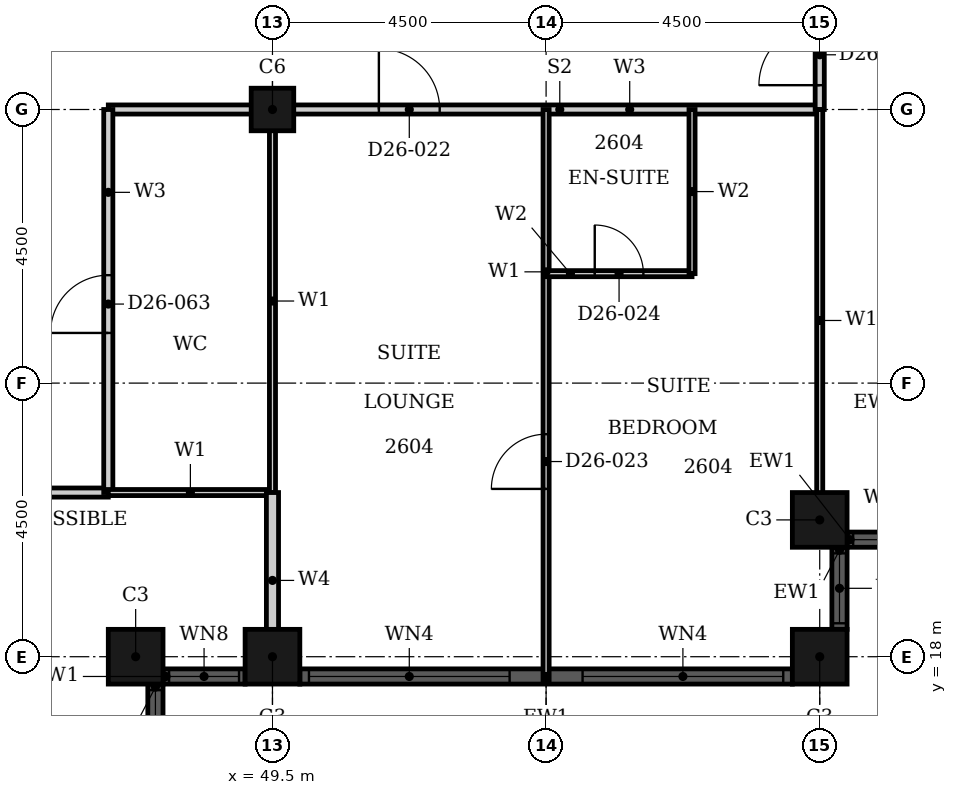
"""IFC4 building model, lengths in metres.
Left out: names, types, materials, properties, quantities, classifications, styles, units other than length and angle.
Written with IfcOpenShell. Run it as: python <this file> out.ifc"""

import sys

from ifc_helpers import new_model, si_unit, direction, frame, frame_2d, origin, origin_2d, place, context, subcontext, project, spatial, rectangle, hollow_rectangle, extrude, element, fill, save


model = new_model("IFC4")
c1 = context("Model", 3, precision=1e-05, world=origin(), true_north=direction((0.0, 1.0)))
c2 = subcontext(c1, "Body", "Model", "MODEL_VIEW")
j1 = project(units=[si_unit("LENGTHUNIT", "METRE"), si_unit("PLANEANGLEUNIT", "RADIAN")], contexts=[c1])
p1 = place(None, origin())
s1 = spatial("IfcSite", under=j1, at=p1, CompositionType="ELEMENT")
p2 = place(p1, origin())
s2 = spatial("IfcBuilding", under=s1, at=p2, CompositionType="ELEMENT")
p3 = place(p2, frame((0.0, 0.0, 108.0)))
s3 = spatial("IfcBuildingStorey", under=s2, at=p3, CompositionType="ELEMENT", Elevation=108.0)
for number, where, z_axis, x_axis in (
    (1, (47.25, 18.0, 0.0), (0.0, 0.0, 1.0), (1.0, 0.0, 0.0)),
    (2, (49.5, 18.0, 0.0), (0.0, 0.0, 1.0), (1.0, 0.0, 0.0)),
    (3, (58.5, 18.0, 0.0), (0.0, 0.0, 1.0), (1.0, 0.0, 0.0)),
    (4, (58.5, 20.25, 0.0), (0.0, 0.0, 1.0), (1.0, 0.0, 0.0)),
):
    element("IfcColumn", number, at=place(p3, frame(where, z_axis=z_axis, x_axis=x_axis)), inside=s3, PredefinedType="COLUMN", context=c2, shape_type="SweptSolid", body=[
        extrude(hollow_rectangle(XDim=0.9, YDim=0.9, WallThickness=0.028, at=origin_2d()), origin(), (0.0, 0.0, 1.0), 3.6),
    ])
p4 = place(p3, frame((49.5, 27.0, 0.0), z_axis=(0.0, 0.0, 1.0), x_axis=(1.0, 0.0, 0.0)))
e5 = element("IfcColumn", 5, at=p4, inside=s3, PredefinedType="COLUMN", context=c2, shape_type="SweptSolid", body=[
    extrude(hollow_rectangle(XDim=0.7, YDim=0.7, WallThickness=0.022, at=origin_2d()), origin(), (0.0, 0.0, 1.0), 3.6),
])
p5 = place(p3, frame((47.575, 16.2, 0.0), z_axis=(0.0, 0.0, 1.0), x_axis=(0.0, 1.0, 0.0)))
e6 = element("IfcWall", 6, at=p5, inside=s3, PredefinedType="SOLIDWALL", context=c2, shape_type="SweptSolid", body=[
    extrude(rectangle(XDim=1.35, YDim=0.25, at=frame_2d((0.675, 0.0))), origin(), (0.0, 0.0, 1.0), 3.6),
])
p6 = place(p5, frame((0.1, 0.0, 0.9)))
e7 = element("IfcOpeningElement", 7, at=p6, cuts=e6, PredefinedType="OPENING", context=c2, shape_type="SweptSolid", body=[
    extrude(rectangle(XDim=1.15, YDim=2.08, at=frame_2d((0.575, 1.04))), frame((0.0, 0.135, 0.0), z_axis=(0.0, -1.0, 0.0), x_axis=(1.0, 0.0, 0.0)), (0.0, 0.0, 1.0), 0.27),
])
p7 = place(p3, frame((47.7, 17.675, 0.0), z_axis=(0.0, 0.0, 1.0), x_axis=(1.0, 0.0, 0.0)))
e8 = element("IfcWall", 8, at=p7, inside=s3, PredefinedType="SOLIDWALL", context=c2, shape_type="SweptSolid", body=[
    extrude(rectangle(XDim=1.35, YDim=0.25, at=frame_2d((0.675, 0.0))), origin(), (0.0, 0.0, 1.0), 3.6),
])
p8 = place(p7, frame((0.1, 0.0, 0.9)))
e9 = element("IfcOpeningElement", 9, at=p8, cuts=e8, PredefinedType="OPENING", context=c2, shape_type="SweptSolid", body=[
    extrude(rectangle(XDim=1.15, YDim=2.08, at=frame_2d((0.575, 1.04))), frame((0.0, 0.135, 0.0), z_axis=(0.0, -1.0, 0.0), x_axis=(1.0, 0.0, 0.0)), (0.0, 0.0, 1.0), 0.27),
])
p9 = place(p3, frame((49.95, 17.675, 0.0), z_axis=(0.0, 0.0, 1.0), x_axis=(1.0, 0.0, 0.0)))
e10 = element("IfcWall", 10, at=p9, inside=s3, PredefinedType="SOLIDWALL", context=c2, shape_type="SweptSolid", body=[
    extrude(rectangle(XDim=8.1, YDim=0.25, at=frame_2d((4.05, 0.0))), origin(), (0.0, 0.0, 1.0), 3.6),
])
p10 = place(p9, frame((0.15, 0.0, 0.9)))
e11 = element("IfcOpeningElement", 11, at=p10, cuts=e10, PredefinedType="OPENING", context=c2, shape_type="SweptSolid", body=[
    extrude(rectangle(XDim=3.3, YDim=2.08, at=frame_2d((1.65, 1.04))), frame((0.0, 0.135, 0.0), z_axis=(0.0, -1.0, 0.0), x_axis=(1.0, 0.0, 0.0)), (0.0, 0.0, 1.0), 0.27),
])
p11 = place(p9, frame((4.65, 0.0, 0.9)))
e12 = element("IfcOpeningElement", 12, at=p11, cuts=e10, PredefinedType="OPENING", context=c2, shape_type="SweptSolid", body=[
    extrude(rectangle(XDim=3.3, YDim=2.08, at=frame_2d((1.65, 1.04))), frame((0.0, 0.135, 0.0), z_axis=(0.0, -1.0, 0.0), x_axis=(1.0, 0.0, 0.0)), (0.0, 0.0, 1.0), 0.27),
])
p12 = place(p3, frame((58.825, 18.45, 0.0), z_axis=(0.0, 0.0, 1.0), x_axis=(0.0, 1.0, 0.0)))
e13 = element("IfcWall", 13, at=p12, inside=s3, PredefinedType="SOLIDWALL", context=c2, shape_type="SweptSolid", body=[
    extrude(rectangle(XDim=1.35, YDim=0.25, at=frame_2d((0.675, 0.0))), origin(), (0.0, 0.0, 1.0), 3.6),
])
p13 = place(p12, frame((0.1, 0.0, 0.9)))
e14 = element("IfcOpeningElement", 14, at=p13, cuts=e13, PredefinedType="OPENING", context=c2, shape_type="SweptSolid", body=[
    extrude(rectangle(XDim=1.15, YDim=2.08, at=frame_2d((0.575, 1.04))), frame((0.0, 0.135, 0.0), z_axis=(0.0, -1.0, 0.0), x_axis=(1.0, 0.0, 0.0)), (0.0, 0.0, 1.0), 0.27),
])
p14 = place(p3, frame((58.95, 19.925, 0.0), z_axis=(0.0, 0.0, 1.0), x_axis=(1.0, 0.0, 0.0)))
e15 = element("IfcWall", 15, at=p14, inside=s3, PredefinedType="SOLIDWALL", context=c2, shape_type="SweptSolid", body=[
    extrude(rectangle(XDim=1.35, YDim=0.25, at=frame_2d((0.675, 0.0))), origin(), (0.0, 0.0, 1.0), 3.6),
])
p15 = place(p14, frame((0.1, 0.0, 0.9)))
e16 = element("IfcOpeningElement", 16, at=p15, cuts=e15, PredefinedType="OPENING", context=c2, shape_type="SweptSolid", body=[
    extrude(rectangle(XDim=1.15, YDim=2.08, at=frame_2d((0.575, 1.04))), frame((0.0, 0.135, 0.0), z_axis=(0.0, -1.0, 0.0), x_axis=(1.0, 0.0, 0.0)), (0.0, 0.0, 1.0), 0.27),
])
p16 = place(p3, frame((40.5, 20.7, 0.0), z_axis=(0.0, 0.0, 1.0), x_axis=(1.0, 0.0, 0.0)))
e17 = element("IfcWall", 17, at=p16, inside=s3, PredefinedType="PARTITIONING", context=c2, shape_type="SweptSolid", body=[
    extrude(rectangle(XDim=6.3, YDim=0.15, at=frame_2d((3.15, 0.0))), origin(), (0.0, 0.0, 1.0), 3.3),
])
p17 = place(p16, frame((2.95, 0.0, 0.0)))
e18 = element("IfcOpeningElement", 18, at=p17, cuts=e17, PredefinedType="OPENING", context=c2, shape_type="SweptSolid", body=[
    extrude(rectangle(XDim=1.0, YDim=2.1, at=frame_2d((0.5, 1.05))), frame((0.0, 0.085, 0.0), z_axis=(0.0, -1.0, 0.0), x_axis=(1.0, 0.0, 0.0)), (0.0, 0.0, 1.0), 0.17),
])
p18 = place(p3, frame((46.8, 27.0, 0.0), z_axis=(0.0, 0.0, 1.0), x_axis=(1.0, 0.0, 0.0)))
e19 = element("IfcWall", 19, at=p18, inside=s3, PredefinedType="PARTITIONING", context=c2, shape_type="SweptSolid", body=[
    extrude(rectangle(XDim=11.7, YDim=0.15, at=frame_2d((5.85, 0.0))), origin(), (0.0, 0.0, 1.0), 2.58),
])
p19 = place(p18, frame((4.45, 0.0, 0.0)))
e20 = element("IfcOpeningElement", 20, at=p19, cuts=e19, PredefinedType="OPENING", context=c2, shape_type="SweptSolid", body=[
    extrude(rectangle(XDim=1.0, YDim=2.1, at=frame_2d((0.5, 1.05))), frame((0.0, 0.085, 0.0), z_axis=(0.0, -1.0, 0.0), x_axis=(1.0, 0.0, 0.0)), (0.0, 0.0, 1.0), 0.17),
])
p20 = place(p3, frame((46.8, 20.7, 0.0), z_axis=(0.0, 0.0, 1.0), x_axis=(0.0, 1.0, 0.0)))
e21 = element("IfcWall", 21, at=p20, inside=s3, PredefinedType="PARTITIONING", context=c2, shape_type="SweptSolid", body=[
    extrude(rectangle(XDim=6.3, YDim=0.15, at=frame_2d((3.15, 0.0))), origin(), (0.0, 0.0, 1.0), 3.3),
])
p21 = place(p20, frame((2.625, 0.0, 0.0)))
e22 = element("IfcOpeningElement", 22, at=p21, cuts=e21, PredefinedType="OPENING", context=c2, shape_type="SweptSolid", body=[
    extrude(rectangle(XDim=0.95, YDim=2.1, at=frame_2d((0.475, 1.05))), frame((0.0, 0.085, 0.0), z_axis=(0.0, -1.0, 0.0), x_axis=(1.0, 0.0, 0.0)), (0.0, 0.0, 1.0), 0.17),
])
p22 = place(p3, frame((58.5, 27.0, 0.0), z_axis=(0.0, 0.0, 1.0), x_axis=(0.0, 1.0, 0.0)))
e23 = element("IfcWall", 23, at=p22, inside=s3, PredefinedType="PARTITIONING", context=c2, shape_type="SweptSolid", body=[
    extrude(rectangle(XDim=1.8, YDim=0.15, at=frame_2d((0.9, 0.0))), origin(), (0.0, 0.0, 1.0), 3.3),
])
p23 = place(p22, frame((0.4, 0.0, 0.0)))
e24 = element("IfcOpeningElement", 24, at=p23, cuts=e23, PredefinedType="OPENING", context=c2, shape_type="SweptSolid", body=[
    extrude(rectangle(XDim=1.0, YDim=2.1, at=frame_2d((0.5, 1.05))), frame((0.0, 0.085, 0.0), z_axis=(0.0, -1.0, 0.0), x_axis=(1.0, 0.0, 0.0)), (0.0, 0.0, 1.0), 0.17),
])
p24 = place(p3, frame((46.8, 20.7, 0.0), z_axis=(0.0, 0.0, 1.0), x_axis=(1.0, 0.0, 0.0)))
e25 = element("IfcWall", 25, at=p24, inside=s3, PredefinedType="PARTITIONING", context=c2, shape_type="SweptSolid", body=[
    extrude(rectangle(XDim=2.7, YDim=0.1, at=frame_2d((1.35, 0.0))), origin(), (0.0, 0.0, 1.0), 3.3),
])
p25 = place(p3, frame((49.5, 20.7, 0.0), z_axis=(0.0, 0.0, 1.0), x_axis=(0.0, 1.0, 0.0)))
e26 = element("IfcWall", 26, at=p25, inside=s3, PredefinedType="PARTITIONING", context=c2, shape_type="SweptSolid", body=[
    extrude(rectangle(XDim=6.3, YDim=0.1, at=frame_2d((3.15, 0.0))), origin(), (0.0, 0.0, 1.0), 2.38),
])
p26 = place(p3, frame((54.0, 17.61, 0.0), z_axis=(0.0, 0.0, 1.0), x_axis=(0.0, 1.0, 0.0)))
e27 = element("IfcWall", 27, at=p26, inside=s3, PredefinedType="PARTITIONING", context=c2, shape_type="SweptSolid", body=[
    extrude(rectangle(XDim=9.39, YDim=0.1, at=frame_2d((4.695, 0.0))), origin(), (0.0, 0.0, 1.0), 3.3),
])
p27 = place(p26, frame((3.15, 0.0, 0.0)))
e28 = element("IfcOpeningElement", 28, at=p27, cuts=e27, PredefinedType="OPENING", context=c2, shape_type="SweptSolid", body=[
    extrude(rectangle(XDim=0.9, YDim=2.1, at=frame_2d((0.45, 1.05))), frame((0.0, 0.06, 0.0), z_axis=(0.0, -1.0, 0.0), x_axis=(1.0, 0.0, 0.0)), (0.0, 0.0, 1.0), 0.12),
])
p28 = place(p3, frame((58.5, 20.06, 0.0), z_axis=(0.0, 0.0, 1.0), x_axis=(0.0, 1.0, 0.0)))
e29 = element("IfcWall", 29, at=p28, inside=s3, PredefinedType="PARTITIONING", context=c2, shape_type="SweptSolid", body=[
    extrude(rectangle(XDim=6.94, YDim=0.1, at=frame_2d((3.47, 0.0))), origin(), (0.0, 0.0, 1.0), 3.3),
])
p29 = place(p3, frame((49.5, 17.81, 0.0), z_axis=(0.0, 0.0, 1.0), x_axis=(0.0, 1.0, 0.0)))
e30 = element("IfcWall", 30, at=p29, inside=s3, PredefinedType="PARTITIONING", context=c2, shape_type="SweptSolid", body=[
    extrude(rectangle(XDim=2.89, YDim=0.2, at=frame_2d((1.445, 0.0))), origin(), (0.0, 0.0, 1.0), 2.38),
])
p30 = place(p3, frame((54.0, 24.3, 0.0), z_axis=(0.0, 0.0, 1.0), x_axis=(1.0, 0.0, 0.0)))
e31 = element("IfcWall", 31, at=p30, inside=s3, PredefinedType="PARTITIONING", context=c2, shape_type="SweptSolid", body=[
    extrude(rectangle(XDim=2.4, YDim=0.1, at=frame_2d((1.2, 0.0))), origin(), (0.0, 0.0, 1.0), 3.3),
])
p31 = place(p30, frame((0.8, 0.0, 0.0)))
e32 = element("IfcOpeningElement", 32, at=p31, cuts=e31, PredefinedType="OPENING", context=c2, shape_type="SweptSolid", body=[
    extrude(rectangle(XDim=0.8, YDim=2.1, at=frame_2d((0.4, 1.05))), frame((0.0, 0.06, 0.0), z_axis=(0.0, -1.0, 0.0), x_axis=(1.0, 0.0, 0.0)), (0.0, 0.0, 1.0), 0.12),
])
p32 = place(p3, frame((56.4, 24.3, 0.0), z_axis=(0.0, 0.0, 1.0), x_axis=(0.0, 1.0, 0.0)))
e33 = element("IfcWall", 33, at=p32, inside=s3, PredefinedType="PARTITIONING", context=c2, shape_type="SweptSolid", body=[
    extrude(rectangle(XDim=2.7, YDim=0.1, at=frame_2d((1.35, 0.0))), origin(), (0.0, 0.0, 1.0), 3.3),
])
p33 = place(p6, origin())
e34 = element("IfcWindow", 34, at=p33, inside=s3, PartitioningType="SINGLE_PANEL", PredefinedType="WINDOW", context=c2, shape_type="SweptSolid", body=[
    extrude(rectangle(XDim=1.15, YDim=2.08, at=frame_2d((0.575, 1.04))), frame((0.0, 0.03, 0.0), z_axis=(0.0, -1.0, 0.0), x_axis=(1.0, 0.0, 0.0)), (0.0, 0.0, 1.0), 0.06),
])
fill(e7, e34)
p34 = place(p8, origin())
e35 = element("IfcWindow", 35, at=p34, inside=s3, PartitioningType="SINGLE_PANEL", PredefinedType="WINDOW", context=c2, shape_type="SweptSolid", body=[
    extrude(rectangle(XDim=1.15, YDim=2.08, at=frame_2d((0.575, 1.04))), frame((0.0, 0.03, 0.0), z_axis=(0.0, -1.0, 0.0), x_axis=(1.0, 0.0, 0.0)), (0.0, 0.0, 1.0), 0.06),
])
fill(e9, e35)
p35 = place(p10, origin())
e36 = element("IfcWindow", 36, at=p35, inside=s3, PartitioningType="SINGLE_PANEL", PredefinedType="WINDOW", context=c2, shape_type="SweptSolid", body=[
    extrude(rectangle(XDim=3.3, YDim=2.08, at=frame_2d((1.65, 1.04))), frame((0.0, 0.03, 0.0), z_axis=(0.0, -1.0, 0.0), x_axis=(1.0, 0.0, 0.0)), (0.0, 0.0, 1.0), 0.06),
])
fill(e11, e36)
p36 = place(p11, origin())
e37 = element("IfcWindow", 37, at=p36, inside=s3, PartitioningType="SINGLE_PANEL", PredefinedType="WINDOW", context=c2, shape_type="SweptSolid", body=[
    extrude(rectangle(XDim=3.3, YDim=2.08, at=frame_2d((1.65, 1.04))), frame((0.0, 0.03, 0.0), z_axis=(0.0, -1.0, 0.0), x_axis=(1.0, 0.0, 0.0)), (0.0, 0.0, 1.0), 0.06),
])
fill(e12, e37)
p37 = place(p13, origin())
e38 = element("IfcWindow", 38, at=p37, inside=s3, PartitioningType="SINGLE_PANEL", PredefinedType="WINDOW", context=c2, shape_type="SweptSolid", body=[
    extrude(rectangle(XDim=1.15, YDim=2.08, at=frame_2d((0.575, 1.04))), frame((0.0, 0.03, 0.0), z_axis=(0.0, -1.0, 0.0), x_axis=(1.0, 0.0, 0.0)), (0.0, 0.0, 1.0), 0.06),
])
fill(e14, e38)
p38 = place(p15, origin())
e39 = element("IfcWindow", 39, at=p38, inside=s3, PartitioningType="SINGLE_PANEL", PredefinedType="WINDOW", context=c2, shape_type="SweptSolid", body=[
    extrude(rectangle(XDim=1.15, YDim=2.08, at=frame_2d((0.575, 1.04))), frame((0.0, 0.03, 0.0), z_axis=(0.0, -1.0, 0.0), x_axis=(1.0, 0.0, 0.0)), (0.0, 0.0, 1.0), 0.06),
])
fill(e16, e39)
p39 = place(p19, origin())
e40 = element("IfcDoor", 40, at=p39, inside=s3, OperationType="SINGLE_SWING_LEFT", PredefinedType="DOOR", context=c2, shape_type="SweptSolid", body=[
    extrude(rectangle(XDim=1.0, YDim=2.1, at=frame_2d((0.5, 1.05))), frame((0.0, 0.025, 0.0), z_axis=(0.0, -1.0, 0.0), x_axis=(1.0, 0.0, 0.0)), (0.0, 0.0, 1.0), 0.05),
])
fill(e20, e40)
p40 = place(p27, origin())
e41 = element("IfcDoor", 41, at=p40, inside=s3, OperationType="SINGLE_SWING_LEFT", PredefinedType="DOOR", context=c2, shape_type="SweptSolid", body=[
    extrude(rectangle(XDim=0.9, YDim=2.1, at=frame_2d((0.45, 1.05))), frame((0.0, 0.025, 0.0), z_axis=(0.0, -1.0, 0.0), x_axis=(1.0, 0.0, 0.0)), (0.0, 0.0, 1.0), 0.05),
])
fill(e28, e41)
p41 = place(p31, origin())
e42 = element("IfcDoor", 42, at=p41, inside=s3, OperationType="SINGLE_SWING_LEFT", PredefinedType="DOOR", context=c2, shape_type="SweptSolid", body=[
    extrude(rectangle(XDim=0.8, YDim=2.1, at=frame_2d((0.4, 1.05))), frame((0.0, 0.025, 0.0), z_axis=(0.0, -1.0, 0.0), x_axis=(1.0, 0.0, 0.0)), (0.0, 0.0, 1.0), 0.05),
])
fill(e32, e42)
p42 = place(p23, origin())
e43 = element("IfcDoor", 43, at=p42, inside=s3, OperationType="SINGLE_SWING_LEFT", PredefinedType="DOOR", context=c2, shape_type="SweptSolid", body=[
    extrude(rectangle(XDim=1.0, YDim=2.1, at=frame_2d((0.5, 1.05))), frame((0.0, 0.025, 0.0), z_axis=(0.0, -1.0, 0.0), x_axis=(1.0, 0.0, 0.0)), (0.0, 0.0, 1.0), 0.05),
])
fill(e24, e43)
p43 = place(p21, origin())
e44 = element("IfcDoor", 44, at=p43, inside=s3, OperationType="SINGLE_SWING_LEFT", PredefinedType="DOOR", context=c2, shape_type="SweptSolid", body=[
    extrude(rectangle(XDim=0.95, YDim=2.1, at=frame_2d((0.475, 1.05))), frame((0.0, 0.025, 0.0), z_axis=(0.0, -1.0, 0.0), x_axis=(1.0, 0.0, 0.0)), (0.0, 0.0, 1.0), 0.05),
])
fill(e22, e44)
save(model, sys.argv[1])
